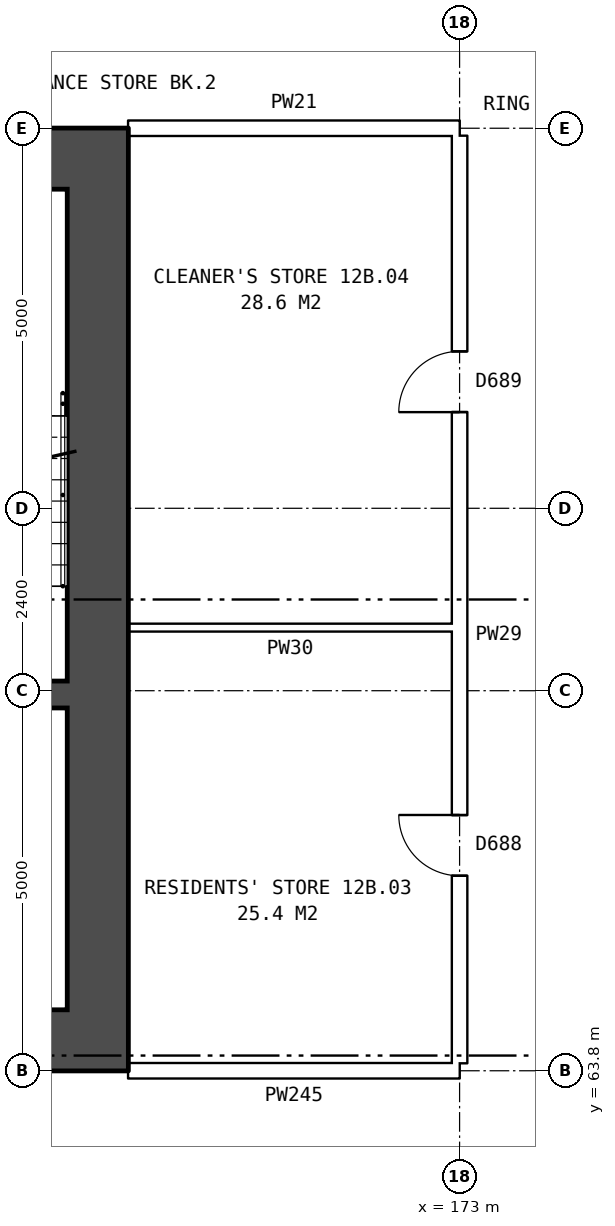
"""IFC4 building model, lengths in metres.
Left out: names, types, materials, properties, quantities, classifications, styles, units other than length and angle.
Written with IfcOpenShell. Run it as: python <this file> out.ifc"""

import sys

from ifc_helpers import new_model, si_unit, direction, frame, frame_2d, origin, place, context, subcontext, project, spatial, rectangle, extrude, element, fill, save


model = new_model("IFC4")
c1 = context("Model", 3, precision=1e-05, world=origin(), true_north=direction((0.0, 1.0)))
c2 = subcontext(c1, "Body", "Model", "MODEL_VIEW")
j1 = project(units=[si_unit("LENGTHUNIT", "METRE"), si_unit("PLANEANGLEUNIT", "RADIAN")], contexts=[c1])
p1 = place(None, origin())
s1 = spatial("IfcSite", under=j1, at=p1, CompositionType="ELEMENT")
p2 = place(p1, origin())
s2 = spatial("IfcBuilding", under=s1, at=p2, CompositionType="ELEMENT")
p3 = place(p2, frame((0.0, 0.0, 47.4)))
s3 = spatial("IfcBuildingStorey", under=s2, at=p3, CompositionType="ELEMENT", Elevation=47.4)
p4 = place(p3, frame((168.24, 75.4, 0.0), z_axis=(0.0, 0.0, 1.0), x_axis=(0.0, -1.0, 0.0)))
e1 = element("IfcWall", 1, at=p4, inside=s3, PredefinedType="SHEAR", context=c2, shape_type="SweptSolid", body=[
    extrude(rectangle(XDim=10.8, YDim=0.8, at=frame_2d((5.4, 0.0))), origin(), (0.0, 0.0, 1.0), 2.85),
])
for number, where, z_axis, x_axis in (
    (2, (160.24, 75.8, 0.0), (0.0, 0.0, 1.0), (1.0, 0.0, 0.0)),
    (3, (160.24, 64.2, 0.0), (0.0, 0.0, 1.0), (1.0, 0.0, 0.0)),
):
    element("IfcWall", number, at=place(p3, frame(where, z_axis=z_axis, x_axis=x_axis)), inside=s3, PredefinedType="SHEAR", context=c2, shape_type="SweptSolid", body=[
        extrude(rectangle(XDim=8.4, YDim=0.8, at=frame_2d((4.2, 0.0))), origin(), (0.0, 0.0, 1.0), 2.85),
    ])
p5 = place(p3, frame((161.04, 68.75, 0.0), z_axis=(0.0, 0.0, 1.0), x_axis=(1.0, 0.0, 0.0)))
e4 = element("IfcWall", 4, at=p5, inside=s3, PredefinedType="SHEAR", context=c2, shape_type="SweptSolid", body=[
    extrude(rectangle(XDim=6.8, YDim=0.35, at=frame_2d((3.4, 0.0))), origin(), (0.0, 0.0, 1.0), 2.85),
])
p6 = place(p5, frame((4.425, 0.0, 0.0)))
e5 = element("IfcOpeningElement", 5, at=p6, cuts=e4, PredefinedType="OPENING", context=c2, shape_type="SweptSolid", body=[
    extrude(rectangle(XDim=1.1, YDim=2.1, at=frame_2d((0.55, 1.05))), frame((0.0, 0.185, 0.0), z_axis=(0.0, -1.0, 0.0), x_axis=(1.0, 0.0, 0.0)), (0.0, 0.0, 1.0), 0.37),
])
p7 = place(p5, frame((2.75, 0.0, 0.0)))
e6 = element("IfcOpeningElement", 6, at=p7, cuts=e4, PredefinedType="OPENING", context=c2, shape_type="SweptSolid", body=[
    extrude(rectangle(XDim=0.85, YDim=2.1, at=frame_2d((0.425, 1.05))), frame((0.0, 0.185, 0.0), z_axis=(0.0, -1.0, 0.0), x_axis=(1.0, 0.0, 0.0)), (0.0, 0.0, 1.0), 0.37),
])
p8 = place(p3, frame((168.64, 63.8, 0.0), z_axis=(0.0, 0.0, 1.0), x_axis=(1.0, 0.0, 0.0)))
e7 = element("IfcWall", 7, at=p8, inside=s3, PredefinedType="PARTITIONING", context=c2, shape_type="SweptSolid", body=[
    extrude(rectangle(XDim=4.36, YDim=0.2, at=frame_2d((2.18, 0.0))), origin(), (0.0, 0.0, 1.0), 2.85),
])
p9 = place(p3, frame((168.64, 69.63, 0.0), z_axis=(0.0, 0.0, 1.0), x_axis=(1.0, 0.0, 0.0)))
e8 = element("IfcWall", 8, at=p9, inside=s3, PredefinedType="PARTITIONING", context=c2, shape_type="SweptSolid", body=[
    extrude(rectangle(XDim=4.26, YDim=0.1, at=frame_2d((2.13, 0.0))), origin(), (0.0, 0.0, 1.0), 2.85),
])
p10 = place(p3, frame((168.64, 76.2, 0.0), z_axis=(0.0, 0.0, 1.0), x_axis=(1.0, 0.0, 0.0)))
e9 = element("IfcWall", 9, at=p10, inside=s3, PredefinedType="PARTITIONING", context=c2, shape_type="SweptSolid", body=[
    extrude(rectangle(XDim=4.36, YDim=0.2, at=frame_2d((2.18, 0.0))), origin(), (0.0, 0.0, 1.0), 2.85),
])
p11 = place(p3, frame((173.0, 63.9, 0.0), z_axis=(0.0, 0.0, 1.0), x_axis=(0.0, 1.0, 0.0)))
e10 = element("IfcWall", 10, at=p11, inside=s3, PredefinedType="PARTITIONING", context=c2, shape_type="SweptSolid", body=[
    extrude(rectangle(XDim=12.2, YDim=0.2, at=frame_2d((6.1, 0.0))), origin(), (0.0, 0.0, 1.0), 2.85),
])
p12 = place(p11, frame((2.465, 0.0, 0.0)))
e11 = element("IfcOpeningElement", 11, at=p12, cuts=e10, PredefinedType="OPENING", context=c2, shape_type="SweptSolid", body=[
    extrude(rectangle(XDim=0.8, YDim=2.1, at=frame_2d((0.4, 1.05))), frame((0.0, 0.11, 0.0), z_axis=(0.0, -1.0, 0.0), x_axis=(1.0, 0.0, 0.0)), (0.0, 0.0, 1.0), 0.22),
])
p13 = place(p11, frame((8.565, 0.0, 0.0)))
e12 = element("IfcOpeningElement", 12, at=p13, cuts=e10, PredefinedType="OPENING", context=c2, shape_type="SweptSolid", body=[
    extrude(rectangle(XDim=0.8, YDim=2.1, at=frame_2d((0.4, 1.05))), frame((0.0, 0.11, 0.0), z_axis=(0.0, -1.0, 0.0), x_axis=(1.0, 0.0, 0.0)), (0.0, 0.0, 1.0), 0.22),
])
p14 = place(p12, origin())
e13 = element("IfcDoor", 13, at=p14, inside=s3, OperationType="SINGLE_SWING_RIGHT", PredefinedType="DOOR", context=c2, shape_type="SweptSolid", body=[
    extrude(rectangle(XDim=0.8, YDim=2.1, at=frame_2d((0.4, 1.05))), frame((0.0, 0.025, 0.0), z_axis=(0.0, -1.0, 0.0), x_axis=(1.0, 0.0, 0.0)), (0.0, 0.0, 1.0), 0.05),
])
fill(e11, e13)
p15 = place(p13, origin())
e14 = element("IfcDoor", 14, at=p15, inside=s3, OperationType="SINGLE_SWING_LEFT", PredefinedType="DOOR", context=c2, shape_type="SweptSolid", body=[
    extrude(rectangle(XDim=0.8, YDim=2.1, at=frame_2d((0.4, 1.05))), frame((0.0, 0.025, 0.0), z_axis=(0.0, -1.0, 0.0), x_axis=(1.0, 0.0, 0.0)), (0.0, 0.0, 1.0), 0.05),
])
fill(e12, e14)
save(model, sys.argv[1])
